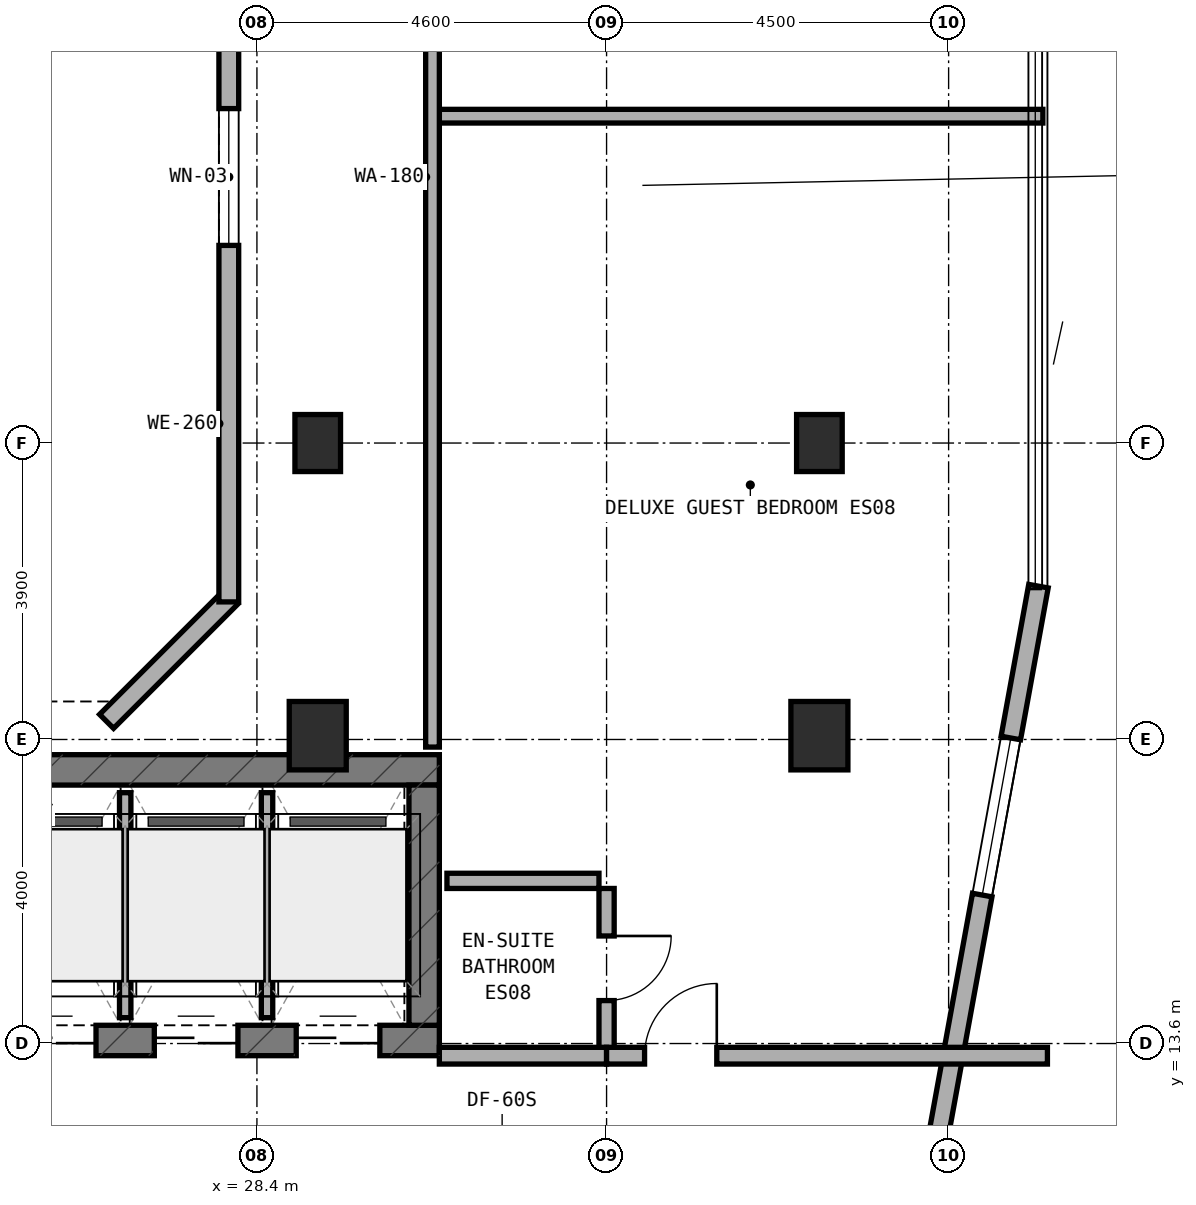
"""IFC4 building model, lengths in metres.
Left out: names, types, materials, properties, quantities, classifications, styles, units other than length and angle.
Written with IfcOpenShell. Run it as: python <this file> out.ifc"""

import sys

from ifc_helpers import new_model, si_unit, direction, frame, frame_2d, origin, origin_2d, place, context, subcontext, project, spatial, rectangle, extrude, element, fill, save


model = new_model("IFC4")
c1 = context("Model", 3, precision=1e-05, world=origin(), true_north=direction((0.0, 1.0)))
c2 = subcontext(c1, "Body", "Model", "MODEL_VIEW")
j1 = project(units=[si_unit("LENGTHUNIT", "METRE"), si_unit("PLANEANGLEUNIT", "RADIAN")], contexts=[c1])
p1 = place(None, origin())
s1 = spatial("IfcSite", under=j1, at=p1, CompositionType="ELEMENT")
p2 = place(p1, origin())
s2 = spatial("IfcBuilding", under=s1, at=p2, CompositionType="ELEMENT")
p3 = place(p2, frame((0.0, 0.0, 254.0)))
s3 = spatial("IfcBuildingStorey", under=s2, at=p3, CompositionType="ELEMENT", Elevation=254.0)
p4 = place(p3, frame((6.4, 13.64, 0.0), z_axis=(0.0, 0.0, 1.0), x_axis=(1.0, 0.0, 0.0)))
e1 = element("IfcWall", 1, at=p4, inside=s3, PredefinedType="SHEAR", context=c2, shape_type="SweptSolid", body=[
    extrude(rectangle(XDim=24.4, YDim=0.4, at=frame_2d((12.2, 0.0))), origin(), (0.0, 0.0, 1.0), 3.6),
])
p5 = place(p4, frame((9.15, 0.0, 0.0)))
e2 = element("IfcOpeningElement", 2, at=p5, cuts=e1, PredefinedType="OPENING", context=c2, shape_type="SweptSolid", body=[
    extrude(rectangle(XDim=1.2, YDim=2.15, at=frame_2d((0.6, 1.075))), frame((0.0, 0.21, 0.0), z_axis=(0.0, -1.0, 0.0), x_axis=(1.0, 0.0, 0.0)), (0.0, 0.0, 1.0), 0.42),
])
p6 = place(p4, frame((16.94, 0.0, 0.0)))
e3 = element("IfcOpeningElement", 3, at=p6, cuts=e1, PredefinedType="OPENING", context=c2, shape_type="SweptSolid", body=[
    extrude(rectangle(XDim=0.85, YDim=2.1, at=frame_2d((0.425, 1.05))), frame((0.0, 0.21, 0.0), z_axis=(0.0, -1.0, 0.0), x_axis=(1.0, 0.0, 0.0)), (0.0, 0.0, 1.0), 0.42),
])
p7 = place(p4, frame((18.783, 0.0, 0.0)))
e4 = element("IfcOpeningElement", 4, at=p7, cuts=e1, PredefinedType="OPENING", context=c2, shape_type="SweptSolid", body=[
    extrude(rectangle(XDim=1.1, YDim=2.15, at=frame_2d((0.55, 1.075))), frame((0.0, 0.21, 0.0), z_axis=(0.0, -1.0, 0.0), x_axis=(1.0, 0.0, 0.0)), (0.0, 0.0, 1.0), 0.42),
])
p8 = place(p4, frame((20.65, 0.0, 0.0)))
e5 = element("IfcOpeningElement", 5, at=p8, cuts=e1, PredefinedType="OPENING", context=c2, shape_type="SweptSolid", body=[
    extrude(rectangle(XDim=1.1, YDim=2.15, at=frame_2d((0.55, 1.075))), frame((0.0, 0.21, 0.0), z_axis=(0.0, -1.0, 0.0), x_axis=(1.0, 0.0, 0.0)), (0.0, 0.0, 1.0), 0.42),
])
p9 = place(p4, frame((22.517, 0.0, 0.0)))
e6 = element("IfcOpeningElement", 6, at=p9, cuts=e1, PredefinedType="OPENING", context=c2, shape_type="SweptSolid", body=[
    extrude(rectangle(XDim=1.1, YDim=2.15, at=frame_2d((0.55, 1.075))), frame((0.0, 0.21, 0.0), z_axis=(0.0, -1.0, 0.0), x_axis=(1.0, 0.0, 0.0)), (0.0, 0.0, 1.0), 0.42),
])
p10 = place(p3, frame((6.4, 17.2, 0.0), z_axis=(0.0, 0.0, 1.0), x_axis=(1.0, 0.0, 0.0)))
e7 = element("IfcWall", 7, at=p10, inside=s3, PredefinedType="SHEAR", context=c2, shape_type="SweptSolid", body=[
    extrude(rectangle(XDim=24.4, YDim=0.4, at=frame_2d((12.2, 0.0))), origin(), (0.0, 0.0, 1.0), 3.6),
])
p11 = place(p3, frame((30.6, 13.84, 0.0), z_axis=(0.0, 0.0, 1.0), x_axis=(0.0, 1.0, 0.0)))
e8 = element("IfcWall", 8, at=p11, inside=s3, PredefinedType="SHEAR", context=c2, shape_type="SweptSolid", body=[
    extrude(rectangle(XDim=3.16, YDim=0.4, at=frame_2d((1.58, 0.0))), origin(), (0.0, 0.0, 1.0), 3.6),
])
p12 = place(p3, frame((35.8, 21.5, 0.0), z_axis=(0.0, 0.0, 1.0), x_axis=(1.0, 0.0, 0.0)))
e9 = element("IfcColumn", 9, at=p12, inside=s3, PredefinedType="COLUMN", context=c2, shape_type="SweptSolid", body=[
    extrude(rectangle(XDim=0.6, YDim=0.75, at=origin_2d()), origin(), (0.0, 0.0, 1.0), 3.6),
])
for number, where, z_axis, x_axis in (
    (10, (35.8, 17.65, 0.0), (0.0, 0.0, 1.0), (1.0, 0.0, 0.0)),
    (11, (29.2, 17.65, 0.0), (0.0, 0.0, 1.0), (1.0, 0.0, 0.0)),
):
    element("IfcColumn", number, at=place(p3, frame(where, z_axis=z_axis, x_axis=x_axis)), inside=s3, PredefinedType="COLUMN", context=c2, shape_type="SweptSolid", body=[
        extrude(rectangle(XDim=0.75, YDim=0.9, at=origin_2d()), origin(), (0.0, 0.0, 1.0), 3.6),
    ])
p13 = place(p3, frame((29.2, 21.5, 0.0), z_axis=(0.0, 0.0, 1.0), x_axis=(1.0, 0.0, 0.0)))
e12 = element("IfcColumn", 12, at=p13, inside=s3, PredefinedType="COLUMN", context=c2, shape_type="SweptSolid", body=[
    extrude(rectangle(XDim=0.6, YDim=0.75, at=origin_2d()), origin(), (0.0, 0.0, 1.0), 3.6),
])
p14 = place(p3, frame((37.171, 11.315, 0.0), z_axis=(0.0, 0.0, 1.0), x_axis=(0.179061111398, 0.983837953316, 0.0)))
e13 = element("IfcWall", 13, at=p14, inside=s3, PredefinedType="STANDARD", context=c2, shape_type="SweptSolid", body=[
    extrude(rectangle(XDim=8.438, YDim=0.26, at=frame_2d((4.219, 0.0))), origin(), (0.0, 0.0, 1.0), 3.32),
])
p15 = place(p14, frame((4.308, 0.0, 0.85)))
e14 = element("IfcOpeningElement", 14, at=p15, cuts=e13, PredefinedType="OPENING", context=c2, shape_type="SweptSolid", body=[
    extrude(rectangle(XDim=2.1, YDim=1.5, at=frame_2d((1.05, 0.75))), frame((0.0, 0.14, 0.0), z_axis=(0.0, -1.0, 0.0), x_axis=(1.0, 0.0, 0.0)), (0.0, 0.0, 1.0), 0.28),
])
p16 = place(p3, frame((26.422, 17.838, 0.0), z_axis=(0.0, 0.0, 1.0), x_axis=(0.707053950914, 0.707159607512, 0.0)))
e15 = element("IfcWall", 15, at=p16, inside=s3, PredefinedType="STANDARD", context=c2, shape_type="SweptSolid", body=[
    extrude(rectangle(XDim=2.311, YDim=0.26, at=frame_2d((1.155, 0.0))), origin(), (0.0, 0.0, 1.0), 3.32),
])
p17 = place(p3, frame((28.03, 19.41, 0.0), z_axis=(0.0, 0.0, 1.0), x_axis=(0.0, 1.0, 0.0)))
e16 = element("IfcWall", 16, at=p17, inside=s3, PredefinedType="STANDARD", context=c2, shape_type="SweptSolid", body=[
    extrude(rectangle(XDim=11.18, YDim=0.26, at=frame_2d((5.59, 0.0))), origin(), (0.0, 0.0, 1.0), 3.32),
])
p18 = place(p17, frame((4.69, 0.0, 0.85)))
e17 = element("IfcOpeningElement", 17, at=p18, cuts=e16, PredefinedType="OPENING", context=c2, shape_type="SweptSolid", body=[
    extrude(rectangle(XDim=1.8, YDim=1.5, at=frame_2d((0.9, 0.75))), frame((0.0, 0.14, 0.0), z_axis=(0.0, -1.0, 0.0), x_axis=(1.0, 0.0, 0.0)), (0.0, 0.0, 1.0), 0.28),
])
p19 = place(p3, frame((26.667, 13.94, 0.0), z_axis=(0.0, 0.0, 1.0), x_axis=(0.0, 1.0, 0.0)))
e18 = element("IfcWall", 18, at=p19, inside=s3, PredefinedType="PARTITIONING", context=c2, shape_type="SweptSolid", body=[
    extrude(rectangle(XDim=2.96, YDim=0.15, at=frame_2d((1.48, 0.0))), origin(), (0.0, 0.0, 1.0), 3.32),
])
p20 = place(p3, frame((28.533, 13.94, 0.0), z_axis=(0.0, 0.0, 1.0), x_axis=(0.0, 1.0, 0.0)))
e19 = element("IfcWall", 19, at=p20, inside=s3, PredefinedType="PARTITIONING", context=c2, shape_type="SweptSolid", body=[
    extrude(rectangle(XDim=2.96, YDim=0.15, at=frame_2d((1.48, 0.0))), origin(), (0.0, 0.0, 1.0), 2.745),
])
p21 = place(p3, frame((30.8, 25.8, 0.0), z_axis=(0.0, 0.0, 1.0), x_axis=(1.0, 0.0, 0.0)))
e20 = element("IfcWall", 20, at=p21, inside=s3, PredefinedType="SOLIDWALL", context=c2, shape_type="SweptSolid", body=[
    extrude(rectangle(XDim=7.94, YDim=0.18, at=frame_2d((3.97, 0.0))), origin(), (0.0, 0.0, 1.0), 3.015),
])
p22 = place(p3, frame((30.71, 17.5, 0.0), z_axis=(0.0, 0.0, 1.0), x_axis=(0.0, 1.0, 0.0)))
e21 = element("IfcWall", 21, at=p22, inside=s3, PredefinedType="SOLIDWALL", context=c2, shape_type="SweptSolid", body=[
    extrude(rectangle(XDim=15.0, YDim=0.18, at=frame_2d((7.5, 0.0))), origin(), (0.0, 0.0, 1.0), 2.745),
])
p23 = place(p3, frame((33.0, 13.54, 0.0), z_axis=(0.0, 0.0, 1.0), x_axis=(0.0, 1.0, 0.0)))
e22 = element("IfcWall", 22, at=p23, inside=s3, PredefinedType="PLUMBINGWALL", context=c2, shape_type="SweptSolid", body=[
    extrude(rectangle(XDim=2.1, YDim=0.2, at=frame_2d((1.05, 0.0))), origin(), (0.0, 0.0, 1.0), 3.32),
])
p24 = place(p23, frame((0.625, 0.0, 0.0)))
e23 = element("IfcOpeningElement", 23, at=p24, cuts=e22, PredefinedType="OPENING", context=c2, shape_type="SweptSolid", body=[
    extrude(rectangle(XDim=0.85, YDim=2.1, at=frame_2d((0.425, 1.05))), frame((0.0, 0.11, 0.0), z_axis=(0.0, -1.0, 0.0), x_axis=(1.0, 0.0, 0.0)), (0.0, 0.0, 1.0), 0.22),
])
p25 = place(p3, frame((30.9, 15.74, 0.0), z_axis=(0.0, 0.0, 1.0), x_axis=(1.0, 0.0, 0.0)))
e24 = element("IfcWall", 24, at=p25, inside=s3, PredefinedType="PLUMBINGWALL", context=c2, shape_type="SweptSolid", body=[
    extrude(rectangle(XDim=2.0, YDim=0.2, at=frame_2d((1.0, 0.0))), origin(), (0.0, 0.0, 1.0), 3.32),
])
p26 = place(p3, frame((30.8, 13.44, 0.0), z_axis=(0.0, 0.0, 1.0), x_axis=(1.0, 0.0, 0.0)))
e25 = element("IfcWall", 25, at=p26, inside=s3, PredefinedType="SOLIDWALL", context=c2, shape_type="SweptSolid", body=[
    extrude(rectangle(XDim=2.2, YDim=0.22, at=frame_2d((1.1, 0.0))), origin(), (0.0, 0.0, 1.0), 3.32),
])
p27 = place(p3, frame((33.0, 13.44, 0.0), z_axis=(0.0, 0.0, 1.0), x_axis=(1.0, 0.0, 0.0)))
e26 = element("IfcWall", 26, at=p27, inside=s3, PredefinedType="SOLIDWALL", context=c2, shape_type="SweptSolid", body=[
    extrude(rectangle(XDim=5.8, YDim=0.22, at=frame_2d((2.9, 0.0))), origin(), (0.0, 0.0, 1.0), 2.745),
])
p28 = place(p27, frame((0.5, 0.0, 0.0)))
e27 = element("IfcOpeningElement", 27, at=p28, cuts=e26, PredefinedType="OPENING", context=c2, shape_type="SweptSolid", body=[
    extrude(rectangle(XDim=0.95, YDim=2.1, at=frame_2d((0.475, 1.05))), frame((0.0, 0.12, 0.0), z_axis=(0.0, -1.0, 0.0), x_axis=(1.0, 0.0, 0.0)), (0.0, 0.0, 1.0), 0.24),
])
p29 = place(p15, origin())
e28 = element("IfcWindow", 28, at=p29, inside=s3, PartitioningType="SINGLE_PANEL", PredefinedType="WINDOW", context=c2, shape_type="SweptSolid", body=[
    extrude(rectangle(XDim=2.1, YDim=1.5, at=frame_2d((1.05, 0.75))), frame((0.0, 0.03, 0.0), z_axis=(0.0, -1.0, 0.0), x_axis=(1.0, 0.0, 0.0)), (0.0, 0.0, 1.0), 0.06),
])
fill(e14, e28)
p30 = place(p18, origin())
e29 = element("IfcWindow", 29, at=p30, inside=s3, PartitioningType="SINGLE_PANEL", PredefinedType="WINDOW", context=c2, shape_type="SweptSolid", body=[
    extrude(rectangle(XDim=1.8, YDim=1.5, at=frame_2d((0.9, 0.75))), frame((0.0, 0.03, 0.0), z_axis=(0.0, -1.0, 0.0), x_axis=(1.0, 0.0, 0.0)), (0.0, 0.0, 1.0), 0.06),
])
fill(e17, e29)
p31 = place(p7, frame((1.1, 0.0, 0.0), z_axis=(0.0, 0.0, 1.0), x_axis=(-1.0, 0.0, 0.0)))
e30 = element("IfcDoor", 30, at=p31, inside=s3, OperationType="DOUBLE_DOOR_SLIDING", PredefinedType="DOOR", context=c2, shape_type="SweptSolid", body=[
    extrude(rectangle(XDim=1.1, YDim=2.15, at=frame_2d((0.55, 1.075))), frame((0.0, 0.025, 0.0), z_axis=(0.0, -1.0, 0.0), x_axis=(1.0, 0.0, 0.0)), (0.0, 0.0, 1.0), 0.05),
])
fill(e4, e30)
p32 = place(p8, frame((1.1, 0.0, 0.0), z_axis=(0.0, 0.0, 1.0), x_axis=(-1.0, 0.0, 0.0)))
e31 = element("IfcDoor", 31, at=p32, inside=s3, OperationType="DOUBLE_DOOR_SLIDING", PredefinedType="DOOR", context=c2, shape_type="SweptSolid", body=[
    extrude(rectangle(XDim=1.1, YDim=2.15, at=frame_2d((0.55, 1.075))), frame((0.0, 0.025, 0.0), z_axis=(0.0, -1.0, 0.0), x_axis=(1.0, 0.0, 0.0)), (0.0, 0.0, 1.0), 0.05),
])
fill(e5, e31)
p33 = place(p9, frame((1.1, 0.0, 0.0), z_axis=(0.0, 0.0, 1.0), x_axis=(-1.0, 0.0, 0.0)))
e32 = element("IfcDoor", 32, at=p33, inside=s3, OperationType="DOUBLE_DOOR_SLIDING", PredefinedType="DOOR", context=c2, shape_type="SweptSolid", body=[
    extrude(rectangle(XDim=1.1, YDim=2.15, at=frame_2d((0.55, 1.075))), frame((0.0, 0.025, 0.0), z_axis=(0.0, -1.0, 0.0), x_axis=(1.0, 0.0, 0.0)), (0.0, 0.0, 1.0), 0.05),
])
fill(e6, e32)
p34 = place(p24, frame((0.85, 0.0, 0.0), z_axis=(0.0, 0.0, 1.0), x_axis=(-1.0, 0.0, 0.0)))
e33 = element("IfcDoor", 33, at=p34, inside=s3, OperationType="SINGLE_SWING_LEFT", PredefinedType="DOOR", context=c2, shape_type="SweptSolid", body=[
    extrude(rectangle(XDim=0.85, YDim=2.1, at=frame_2d((0.425, 1.05))), frame((0.0, 0.025, 0.0), z_axis=(0.0, -1.0, 0.0), x_axis=(1.0, 0.0, 0.0)), (0.0, 0.0, 1.0), 0.05),
])
fill(e23, e33)
p35 = place(p28, origin())
e34 = element("IfcDoor", 34, at=p35, inside=s3, OperationType="SINGLE_SWING_RIGHT", PredefinedType="DOOR", context=c2, shape_type="SweptSolid", body=[
    extrude(rectangle(XDim=0.95, YDim=2.1, at=frame_2d((0.475, 1.05))), frame((0.0, 0.025, 0.0), z_axis=(0.0, -1.0, 0.0), x_axis=(1.0, 0.0, 0.0)), (0.0, 0.0, 1.0), 0.05),
])
fill(e27, e34)
save(model, sys.argv[1])
